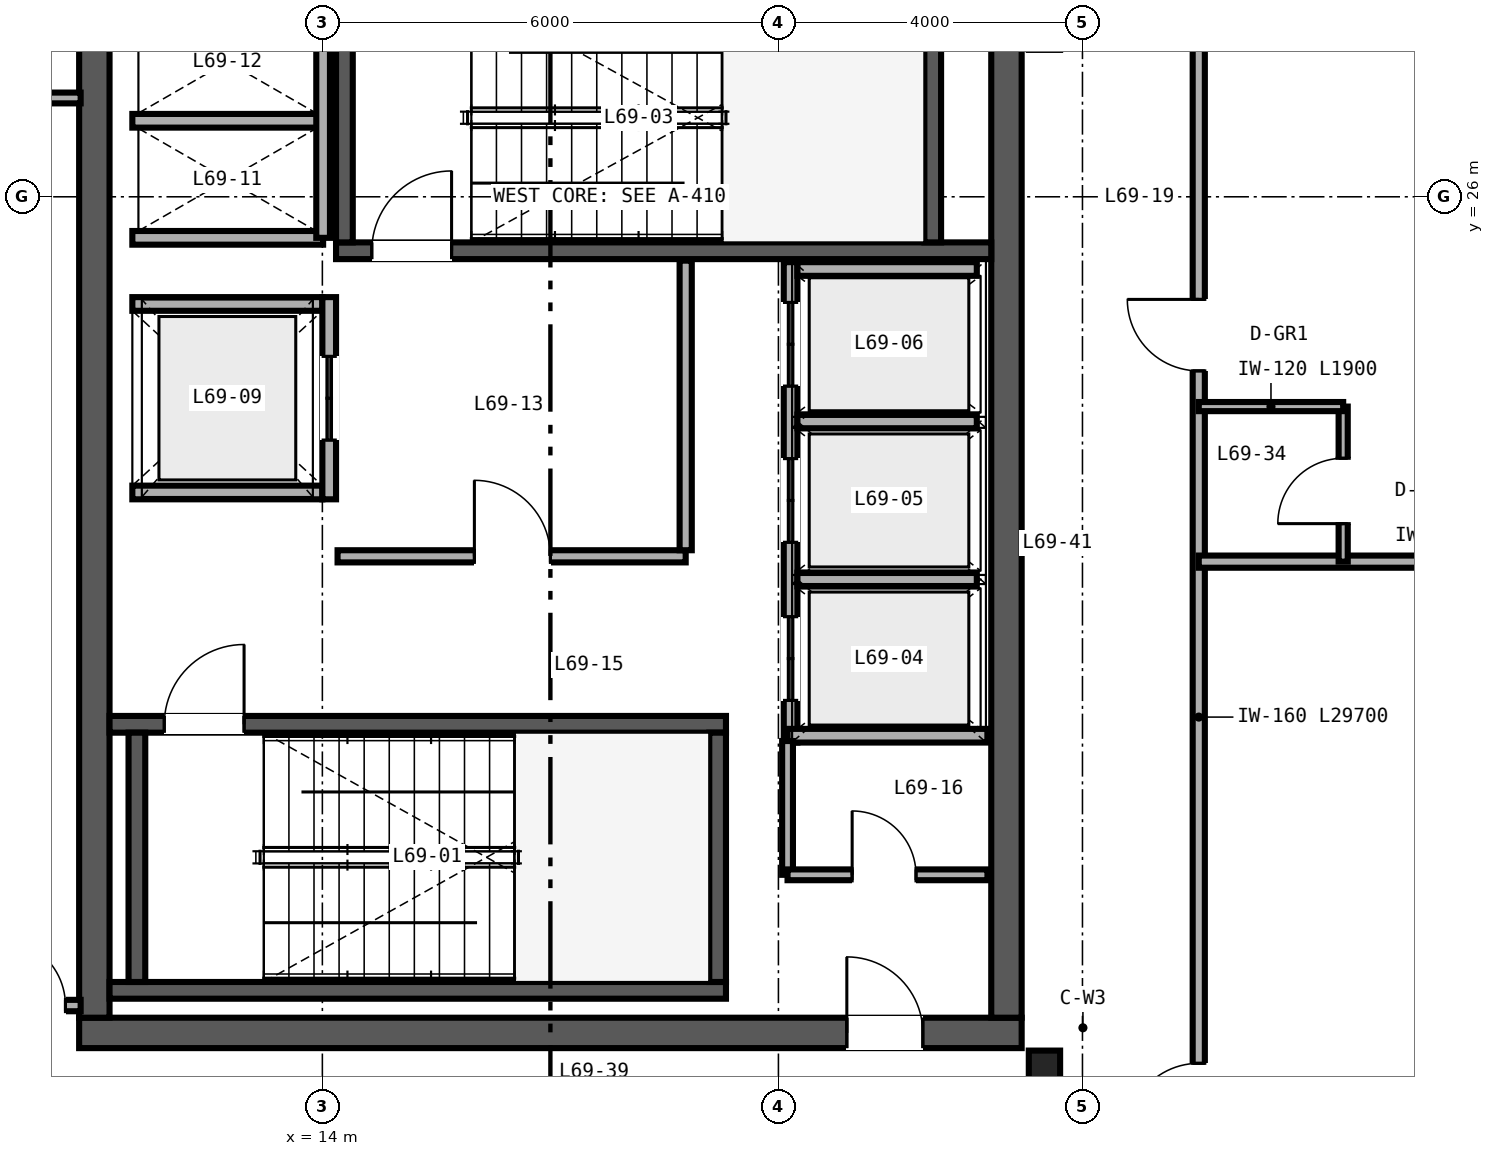
"""IFC4 building model, lengths in metres.
Left out: names, types, materials, properties, quantities, classifications, styles, units other than length and angle.
Written with IfcOpenShell. Run it as: python <this file> out.ifc"""

import sys

from ifc_helpers import new_model, si_unit, direction, frame, frame_2d, origin, origin_2d, place, context, subcontext, project, spatial, rectangle, i_section, extrude, source, transform, mapped, element, fill, save


model = new_model("IFC4")
c1 = context("Model", 3, precision=1e-05, world=origin(), true_north=direction((0.0, 1.0)))
c2 = subcontext(c1, "Body", "Model", "MODEL_VIEW")
j1 = project(units=[si_unit("LENGTHUNIT", "METRE"), si_unit("PLANEANGLEUNIT", "RADIAN")], contexts=[c1])
p1 = place(None, origin())
s1 = spatial("IfcSite", under=j1, at=p1, CompositionType="ELEMENT")
p2 = place(p1, origin())
s2 = spatial("IfcBuilding", under=s1, at=p2, CompositionType="ELEMENT")
p3 = place(p2, frame((0.0, 0.0, 272.4)))
s3 = spatial("IfcBuildingStorey", under=s2, at=p3, CompositionType="ELEMENT", Elevation=272.4)
p4 = place(p3, frame((10.8, 15.0, 0.0), z_axis=(0.0, 0.0, 1.0), x_axis=(1.0, 0.0, 0.0)))
e1 = element("IfcWall", 1, at=p4, inside=s3, PredefinedType="SHEAR", context=c2, shape_type="SweptSolid", body=[
    extrude(rectangle(XDim=12.4, YDim=0.4, at=frame_2d((6.2, 0.0))), origin(), (0.0, 0.0, 1.0), 3.38),
])
p5 = place(p4, frame((10.1, 0.0, 0.0)))
e2 = element("IfcOpeningElement", 2, at=p5, cuts=e1, PredefinedType="OPENING", context=c2, shape_type="SweptSolid", body=[
    extrude(rectangle(XDim=1.0, YDim=2.15, at=frame_2d((0.5, 1.075))), frame((0.0, 0.21, 0.0), z_axis=(0.0, -1.0, 0.0), x_axis=(1.0, 0.0, 0.0)), (0.0, 0.0, 1.0), 0.42),
])
for number, where, z_axis, x_axis in (
    (3, (11.0, 15.2, 0.0), (0.0, 0.0, 1.0), (0.0, 1.0, 0.0)),
    (4, (23.0, 15.2, 0.0), (0.0, 0.0, 1.0), (0.0, 1.0, 0.0)),
):
    element("IfcWall", number, at=place(p3, frame(where, z_axis=z_axis, x_axis=x_axis)), inside=s3, PredefinedType="SHEAR", context=c2, shape_type="SweptSolid", body=[
        extrude(rectangle(XDim=21.6, YDim=0.4, at=frame_2d((10.8, 0.0))), origin(), (0.0, 0.0, 1.0), 3.38),
    ])
p6 = place(p3, frame((11.2, 15.56, 0.0), z_axis=(0.0, 0.0, 1.0), x_axis=(1.0, 0.0, 0.0)))
e5 = element("IfcWall", 5, at=p6, inside=s3, PredefinedType="SHEAR", context=c2, shape_type="SweptSolid", body=[
    extrude(rectangle(XDim=8.11, YDim=0.22, at=frame_2d((4.055, 0.0))), origin(), (0.0, 0.0, 1.0), 3.4),
])
p7 = place(p3, frame((11.2, 19.06, 0.0), z_axis=(0.0, 0.0, 1.0), x_axis=(1.0, 0.0, 0.0)))
e6 = element("IfcWall", 6, at=p7, inside=s3, PredefinedType="SHEAR", context=c2, shape_type="SweptSolid", body=[
    extrude(rectangle(XDim=8.11, YDim=0.22, at=frame_2d((4.055, 0.0))), origin(), (0.0, 0.0, 1.0), 3.4),
])
p8 = place(p7, frame((0.72, 0.0, 0.0)))
e7 = element("IfcOpeningElement", 7, at=p8, cuts=e6, PredefinedType="OPENING", context=c2, shape_type="SweptSolid", body=[
    extrude(rectangle(XDim=1.05, YDim=2.15, at=frame_2d((0.525, 1.075))), frame((0.0, 0.12, 0.0), z_axis=(0.0, -1.0, 0.0), x_axis=(1.0, 0.0, 0.0)), (0.0, 0.0, 1.0), 0.24),
])
for number, where, z_axis, x_axis in (
    (8, (11.56, 15.67, 0.0), (0.0, 0.0, 1.0), (0.0, 1.0, 0.0)),
    (9, (19.2, 15.67, 0.0), (0.0, 0.0, 1.0), (0.0, 1.0, 0.0)),
):
    element("IfcWall", number, at=place(p3, frame(where, z_axis=z_axis, x_axis=x_axis)), inside=s3, PredefinedType="SHEAR", context=c2, shape_type="SweptSolid", body=[
        extrude(rectangle(XDim=3.28, YDim=0.22, at=frame_2d((1.64, 0.0))), origin(), (0.0, 0.0, 1.0), 3.4),
    ])
p9 = place(p3, frame((14.18, 25.29, 0.0), z_axis=(0.0, 0.0, 1.0), x_axis=(1.0, 0.0, 0.0)))
e10 = element("IfcWall", 10, at=p9, inside=s3, PredefinedType="SHEAR", context=c2, shape_type="SweptSolid", body=[
    extrude(rectangle(XDim=8.62, YDim=0.22, at=frame_2d((4.31, 0.0))), origin(), (0.0, 0.0, 1.0), 3.4),
])
p10 = place(p9, frame((0.47, 0.0, 0.0)))
e11 = element("IfcOpeningElement", 11, at=p10, cuts=e10, PredefinedType="OPENING", context=c2, shape_type="SweptSolid", body=[
    extrude(rectangle(XDim=1.05, YDim=2.15, at=frame_2d((0.525, 1.075))), frame((0.0, 0.12, 0.0), z_axis=(0.0, -1.0, 0.0), x_axis=(1.0, 0.0, 0.0)), (0.0, 0.0, 1.0), 0.24),
])
for number, where, z_axis, x_axis in (
    (12, (14.29, 25.4, 0.0), (0.0, 0.0, 1.0), (0.0, 1.0, 0.0)),
    (13, (22.03, 25.4, 0.0), (0.0, 0.0, 1.0), (0.0, 1.0, 0.0)),
):
    element("IfcWall", number, at=place(p3, frame(where, z_axis=z_axis, x_axis=x_axis)), inside=s3, PredefinedType="SHEAR", context=c2, shape_type="SweptSolid", body=[
        extrude(rectangle(XDim=3.28, YDim=0.22, at=frame_2d((1.64, 0.0))), origin(), (0.0, 0.0, 1.0), 3.4),
    ])
m1 = source(origin(), c2, "Body", "SweptSolid", [
    extrude(i_section(OverallWidth=0.412, OverallDepth=0.435, WebThickness=0.036, FlangeThickness=0.057, FilletRadius=0.025, at=origin_2d()), origin(), (0.0, 0.0, 1.0), 3.38),
])
p11 = place(p3, frame((23.5, 14.55, 0.0), z_axis=(0.0, 0.0, 1.0), x_axis=(1.0, 0.0, 0.0)))
e14 = element("IfcColumn", 14, at=p11, inside=s3, PredefinedType="COLUMN", context=c2, shape_type="MappedRepresentation", body=[
    mapped(m1, transform((0.0, 0.0, 0.0), scale=1.0)),
])
p12 = place(p3, frame((20.16, 18.82, 0.0), z_axis=(0.0, 0.0, 1.0), x_axis=(0.0, 1.0, 0.0)))
e15 = element("IfcWall", 15, at=p12, inside=s3, PredefinedType="SOLIDWALL", context=c2, shape_type="SweptSolid", body=[
    extrude(rectangle(XDim=6.32, YDim=0.18, at=frame_2d((3.16, 0.0))), origin(), (0.0, 0.0, 1.0), 2.48),
])
p13 = place(p12, frame((0.555, 0.0, 0.0)))
e16 = element("IfcOpeningElement", 16, at=p13, cuts=e15, PredefinedType="OPENING", context=c2, shape_type="SweptSolid", body=[
    extrude(rectangle(XDim=1.1, YDim=2.2, at=frame_2d((0.55, 1.1))), frame((0.0, 0.1, 0.0), z_axis=(0.0, -1.0, 0.0), x_axis=(1.0, 0.0, 0.0)), (0.0, 0.0, 1.0), 0.2),
])
p14 = place(p12, frame((2.635, 0.0, 0.0)))
e17 = element("IfcOpeningElement", 17, at=p14, cuts=e15, PredefinedType="OPENING", context=c2, shape_type="SweptSolid", body=[
    extrude(rectangle(XDim=1.1, YDim=2.2, at=frame_2d((0.55, 1.1))), frame((0.0, 0.1, 0.0), z_axis=(0.0, -1.0, 0.0), x_axis=(1.0, 0.0, 0.0)), (0.0, 0.0, 1.0), 0.2),
])
p15 = place(p12, frame((4.69, 0.0, 0.0)))
e18 = element("IfcOpeningElement", 18, at=p15, cuts=e15, PredefinedType="OPENING", context=c2, shape_type="SweptSolid", body=[
    extrude(rectangle(XDim=1.1, YDim=2.2, at=frame_2d((0.55, 1.1))), frame((0.0, 0.1, 0.0), z_axis=(0.0, -1.0, 0.0), x_axis=(1.0, 0.0, 0.0)), (0.0, 0.0, 1.0), 0.2),
])
p16 = place(p3, frame((20.12, 18.91, 0.0), z_axis=(0.0, 0.0, 1.0), x_axis=(1.0, 0.0, 0.0)))
e19 = element("IfcWall", 19, at=p16, inside=s3, PredefinedType="SOLIDWALL", context=c2, shape_type="SweptSolid", body=[
    extrude(rectangle(XDim=2.63, YDim=0.18, at=frame_2d((1.315, 0.0))), origin(), (0.0, 0.0, 1.0), 3.38),
])
p17 = place(p3, frame((20.25, 25.05, 0.0), z_axis=(0.0, 0.0, 1.0), x_axis=(1.0, 0.0, 0.0)))
e20 = element("IfcWall", 20, at=p17, inside=s3, PredefinedType="SOLIDWALL", context=c2, shape_type="SweptSolid", body=[
    extrude(rectangle(XDim=2.36, YDim=0.18, at=frame_2d((1.18, 0.0))), origin(), (0.0, 0.0, 1.0), 3.38),
])
p18 = place(p3, frame((20.25, 20.965, 0.0), z_axis=(0.0, 0.0, 1.0), x_axis=(1.0, 0.0, 0.0)))
e21 = element("IfcWall", 21, at=p18, inside=s3, PredefinedType="SOLIDWALL", context=c2, shape_type="SweptSolid", body=[
    extrude(rectangle(XDim=2.36, YDim=0.18, at=frame_2d((1.18, 0.0))), origin(), (0.0, 0.0, 1.0), 2.48),
])
p19 = place(p3, frame((20.25, 23.045, 0.0), z_axis=(0.0, 0.0, 1.0), x_axis=(1.0, 0.0, 0.0)))
e22 = element("IfcWall", 22, at=p19, inside=s3, PredefinedType="SOLIDWALL", context=c2, shape_type="SweptSolid", body=[
    extrude(rectangle(XDim=2.36, YDim=0.18, at=frame_2d((1.18, 0.0))), origin(), (0.0, 0.0, 1.0), 3.38),
])
for number, where, z_axis, x_axis in (
    (23, (11.5, 22.11, 0.0), (0.0, 0.0, 1.0), (1.0, 0.0, 0.0)),
    (24, (11.5, 24.59, 0.0), (0.0, 0.0, 1.0), (1.0, 0.0, 0.0)),
):
    element("IfcWall", number, at=place(p3, frame(where, z_axis=z_axis, x_axis=x_axis)), inside=s3, PredefinedType="SOLIDWALL", context=c2, shape_type="SweptSolid", body=[
        extrude(rectangle(XDim=2.5, YDim=0.18, at=frame_2d((1.25, 0.0))), origin(), (0.0, 0.0, 1.0), 3.38),
    ])
p20 = place(p3, frame((14.09, 22.02, 0.0), z_axis=(0.0, 0.0, 1.0), x_axis=(0.0, 1.0, 0.0)))
e25 = element("IfcWall", 25, at=p20, inside=s3, PredefinedType="SOLIDWALL", context=c2, shape_type="SweptSolid", body=[
    extrude(rectangle(XDim=2.66, YDim=0.18, at=frame_2d((1.33, 0.0))), origin(), (0.0, 0.0, 1.0), 3.38),
])
p21 = place(p20, frame((0.78, 0.0, 0.0)))
e26 = element("IfcOpeningElement", 26, at=p21, cuts=e25, PredefinedType="OPENING", context=c2, shape_type="SweptSolid", body=[
    extrude(rectangle(XDim=1.1, YDim=2.2, at=frame_2d((0.55, 1.1))), frame((0.0, 0.1, 0.0), z_axis=(0.0, -1.0, 0.0), x_axis=(1.0, 0.0, 0.0)), (0.0, 0.0, 1.0), 0.2),
])
for number, where, z_axis, x_axis in (
    (27, (11.5, 25.46, 0.0), (0.0, 0.0, 1.0), (1.0, 0.0, 0.0)),
    (28, (11.5, 27.0, 0.0), (0.0, 0.0, 1.0), (1.0, 0.0, 0.0)),
):
    element("IfcWall", number, at=place(p3, frame(where, z_axis=z_axis, x_axis=x_axis)), inside=s3, PredefinedType="SOLIDWALL", context=c2, shape_type="SweptSolid", body=[
        extrude(rectangle(XDim=2.51, YDim=0.18, at=frame_2d((1.255, 0.0))), origin(), (0.0, 0.0, 1.0), 3.38),
    ])
p22 = place(p3, frame((14.01, 25.46, 0.0), z_axis=(0.0, 0.0, 1.0), x_axis=(0.0, 1.0, 0.0)))
e29 = element("IfcWall", 29, at=p22, inside=s3, PredefinedType="SOLIDWALL", context=c2, shape_type="SweptSolid", body=[
    extrude(rectangle(XDim=3.08, YDim=0.18, at=frame_2d((1.54, 0.0))), origin(), (0.0, 0.0, 1.0), 3.38),
])
p23 = place(p3, frame((14.2, 21.27, 0.0), z_axis=(0.0, 0.0, 1.0), x_axis=(1.0, 0.0, 0.0)))
e30 = element("IfcWall", 30, at=p23, inside=s3, PredefinedType="PARTITIONING", context=c2, shape_type="SweptSolid", body=[
    extrude(rectangle(XDim=4.58, YDim=0.16, at=frame_2d((2.29, 0.0))), origin(), (0.0, 0.0, 1.0), 3.38),
])
p24 = place(p23, frame((1.8, 0.0, 0.0)))
e31 = element("IfcOpeningElement", 31, at=p24, cuts=e30, PredefinedType="OPENING", context=c2, shape_type="SweptSolid", body=[
    extrude(rectangle(XDim=1.0, YDim=2.15, at=frame_2d((0.5, 1.075))), frame((0.0, 0.09, 0.0), z_axis=(0.0, -1.0, 0.0), x_axis=(1.0, 0.0, 0.0)), (0.0, 0.0, 1.0), 0.18),
])
p25 = place(p3, frame((18.78, 21.35, 0.0), z_axis=(0.0, 0.0, 1.0), x_axis=(0.0, 1.0, 0.0)))
e32 = element("IfcWall", 32, at=p25, inside=s3, PredefinedType="PARTITIONING", context=c2, shape_type="SweptSolid", body=[
    extrude(rectangle(XDim=3.81, YDim=0.16, at=frame_2d((1.905, 0.0))), origin(), (0.0, 0.0, 1.0), 3.38),
])
p26 = place(p3, frame((20.12, 17.08, 0.0), z_axis=(0.0, 0.0, 1.0), x_axis=(0.0, 1.0, 0.0)))
e33 = element("IfcWall", 33, at=p26, inside=s3, PredefinedType="PARTITIONING", context=c2, shape_type="SweptSolid", body=[
    extrude(rectangle(XDim=1.76, YDim=0.142, at=frame_2d((0.88, 0.0))), origin(), (0.0, 0.0, 1.0), 3.38),
])
p27 = place(p3, frame((20.12, 17.08, 0.0), z_axis=(0.0, 0.0, 1.0), x_axis=(1.0, 0.0, 0.0)))
e34 = element("IfcWall", 34, at=p27, inside=s3, PredefinedType="PARTITIONING", context=c2, shape_type="SweptSolid", body=[
    extrude(rectangle(XDim=2.63, YDim=0.142, at=frame_2d((1.315, 0.0))), origin(), (0.0, 0.0, 1.0), 3.38),
])
p28 = place(p27, frame((0.85, 0.0, 0.0)))
e35 = element("IfcOpeningElement", 35, at=p28, cuts=e34, PredefinedType="OPENING", context=c2, shape_type="SweptSolid", body=[
    extrude(rectangle(XDim=0.84, YDim=2.1, at=frame_2d((0.42, 1.05))), frame((0.0, 0.081, 0.0), z_axis=(0.0, -1.0, 0.0), x_axis=(1.0, 0.0, 0.0)), (0.0, 0.0, 1.0), 0.162),
])
p29 = place(p3, frame((8.16, 15.36, 0.0), z_axis=(0.0, 0.0, 1.0), x_axis=(1.0, 0.0, 0.0)))
e36 = element("IfcWall", 36, at=p29, inside=s3, PredefinedType="PARTITIONING", context=c2, shape_type="SweptSolid", body=[
    extrude(rectangle(XDim=2.66, YDim=0.15, at=frame_2d((1.33, 0.0))), origin(), (0.0, 0.0, 1.0), 2.601),
])
p30 = place(p29, frame((1.58, 0.0, 0.0)))
e37 = element("IfcOpeningElement", 37, at=p30, cuts=e36, PredefinedType="OPENING", context=c2, shape_type="SweptSolid", body=[
    extrude(rectangle(XDim=0.88, YDim=2.15, at=frame_2d((0.44, 1.075))), frame((0.0, 0.085, 0.0), z_axis=(0.0, -1.0, 0.0), x_axis=(1.0, 0.0, 0.0)), (0.0, 0.0, 1.0), 0.17),
])
p31 = place(p3, frame((8.16, 27.3, 0.0), z_axis=(0.0, 0.0, 1.0), x_axis=(1.0, 0.0, 0.0)))
e38 = element("IfcWall", 38, at=p31, inside=s3, PredefinedType="PARTITIONING", context=c2, shape_type="SweptSolid", body=[
    extrude(rectangle(XDim=2.66, YDim=0.142, at=frame_2d((1.33, 0.0))), origin(), (0.0, 0.0, 1.0), 2.601),
])
p32 = place(p3, frame((25.53, 11.15, 0.0), z_axis=(0.0, 0.0, 1.0), x_axis=(0.0, 1.0, 0.0)))
e39 = element("IfcWall", 39, at=p32, inside=s3, PredefinedType="PARTITIONING", context=c2, shape_type="SweptSolid", body=[
    extrude(rectangle(XDim=29.7, YDim=0.16, at=frame_2d((14.85, 0.0))), origin(), (0.0, 0.0, 1.0), 2.524),
])
p33 = place(p32, frame((2.51, 0.0, 0.0)))
e40 = element("IfcOpeningElement", 40, at=p33, cuts=e39, PredefinedType="OPENING", context=c2, shape_type="SweptSolid", body=[
    extrude(rectangle(XDim=0.94, YDim=2.15, at=frame_2d((0.47, 1.075))), frame((0.0, 0.09, 0.0), z_axis=(0.0, -1.0, 0.0), x_axis=(1.0, 0.0, 0.0)), (0.0, 0.0, 1.0), 0.18),
])
p34 = place(p32, frame((12.56, 0.0, 0.0)))
e41 = element("IfcOpeningElement", 41, at=p34, cuts=e39, PredefinedType="OPENING", context=c2, shape_type="SweptSolid", body=[
    extrude(rectangle(XDim=0.94, YDim=2.15, at=frame_2d((0.47, 1.075))), frame((0.0, 0.09, 0.0), z_axis=(0.0, -1.0, 0.0), x_axis=(1.0, 0.0, 0.0)), (0.0, 0.0, 1.0), 0.18),
])
p35 = place(p32, frame((22.16, 0.0, 0.0)))
e42 = element("IfcOpeningElement", 42, at=p35, cuts=e39, PredefinedType="OPENING", context=c2, shape_type="SweptSolid", body=[
    extrude(rectangle(XDim=0.94, YDim=2.15, at=frame_2d((0.47, 1.075))), frame((0.0, 0.09, 0.0), z_axis=(0.0, -1.0, 0.0), x_axis=(1.0, 0.0, 0.0)), (0.0, 0.0, 1.0), 0.18),
])
p36 = place(p3, frame((25.53, 21.2, 0.0), z_axis=(0.0, 0.0, 1.0), x_axis=(1.0, 0.0, 0.0)))
e43 = element("IfcWall", 43, at=p36, inside=s3, PredefinedType="PARTITIONING", context=c2, shape_type="SweptSolid", body=[
    extrude(rectangle(XDim=7.15, YDim=0.16, at=frame_2d((3.575, 0.0))), origin(), (0.0, 0.0, 1.0), 2.601),
])
p37 = place(p3, frame((27.43, 21.2, 0.0), z_axis=(0.0, 0.0, 1.0), x_axis=(0.0, 1.0, 0.0)))
e44 = element("IfcWall", 44, at=p37, inside=s3, PredefinedType="PARTITIONING", context=c2, shape_type="SweptSolid", body=[
    extrude(rectangle(XDim=2.04, YDim=0.12, at=frame_2d((1.02, 0.0))), origin(), (0.0, 0.0, 1.0), 3.38),
])
p38 = place(p37, frame((0.5, 0.0, 0.0)))
e45 = element("IfcOpeningElement", 45, at=p38, cuts=e44, PredefinedType="OPENING", context=c2, shape_type="SweptSolid", body=[
    extrude(rectangle(XDim=0.86, YDim=2.1, at=frame_2d((0.43, 1.05))), frame((0.0, 0.07, 0.0), z_axis=(0.0, -1.0, 0.0), x_axis=(1.0, 0.0, 0.0)), (0.0, 0.0, 1.0), 0.14),
])
p39 = place(p3, frame((25.53, 23.24, 0.0), z_axis=(0.0, 0.0, 1.0), x_axis=(1.0, 0.0, 0.0)))
e46 = element("IfcWall", 46, at=p39, inside=s3, PredefinedType="PARTITIONING", context=c2, shape_type="SweptSolid", body=[
    extrude(rectangle(XDim=1.9, YDim=0.12, at=frame_2d((0.95, 0.0))), origin(), (0.0, 0.0, 1.0), 3.38),
])
m2 = source(origin(), c2, "Body", "SweptSolid", [
    extrude(rectangle(XDim=1.05, YDim=2.15, at=frame_2d((0.525, 1.075))), frame((0.0, 0.025, 0.0), z_axis=(0.0, -1.0, 0.0), x_axis=(1.0, 0.0, 0.0)), (0.0, 0.0, 1.0), 0.05),
])
p40 = place(p8, origin())
e47 = element("IfcDoor", 47, at=p40, inside=s3, OperationType="SINGLE_SWING_RIGHT", PredefinedType="DOOR", context=c2, shape_type="MappedRepresentation", body=[
    mapped(m2, transform((0.0, 0.0, 0.0), scale=1.0)),
])
fill(e7, e47)
p41 = place(p10, origin())
e48 = element("IfcDoor", 48, at=p41, inside=s3, OperationType="SINGLE_SWING_RIGHT", PredefinedType="DOOR", context=c2, shape_type="MappedRepresentation", body=[
    mapped(m2, transform((0.0, 0.0, 0.0), scale=1.0)),
])
fill(e11, e48)
m3 = source(origin(), c2, "Body", "SweptSolid", [
    extrude(rectangle(XDim=1.1, YDim=2.2, at=frame_2d((0.55, 1.1))), frame((0.0, 0.025, 0.0), z_axis=(0.0, -1.0, 0.0), x_axis=(1.0, 0.0, 0.0)), (0.0, 0.0, 1.0), 0.05),
])
p42 = place(p13, origin())
e49 = element("IfcDoor", 49, at=p42, inside=s3, OperationType="DOUBLE_DOOR_SLIDING", PredefinedType="DOOR", context=c2, shape_type="MappedRepresentation", body=[
    mapped(m3, transform((0.0, 0.0, 0.0), scale=1.0)),
])
fill(e16, e49)
p43 = place(p14, origin())
e50 = element("IfcDoor", 50, at=p43, inside=s3, OperationType="DOUBLE_DOOR_SLIDING", PredefinedType="DOOR", context=c2, shape_type="MappedRepresentation", body=[
    mapped(m3, transform((0.0, 0.0, 0.0), scale=1.0)),
])
fill(e17, e50)
p44 = place(p15, origin())
e51 = element("IfcDoor", 51, at=p44, inside=s3, OperationType="DOUBLE_DOOR_SLIDING", PredefinedType="DOOR", context=c2, shape_type="MappedRepresentation", body=[
    mapped(m3, transform((0.0, 0.0, 0.0), scale=1.0)),
])
fill(e18, e51)
p45 = place(p21, origin())
e52 = element("IfcDoor", 52, at=p45, inside=s3, OperationType="DOUBLE_DOOR_SLIDING", PredefinedType="DOOR", context=c2, shape_type="MappedRepresentation", body=[
    mapped(m3, transform((0.0, 0.0, 0.0), scale=1.0)),
])
fill(e26, e52)
m4 = source(origin(), c2, "Body", "SweptSolid", [
    extrude(rectangle(XDim=1.0, YDim=2.15, at=frame_2d((0.5, 1.075))), frame((0.0, 0.025, 0.0), z_axis=(0.0, -1.0, 0.0), x_axis=(1.0, 0.0, 0.0)), (0.0, 0.0, 1.0), 0.05),
])
p46 = place(p24, origin())
e53 = element("IfcDoor", 53, at=p46, inside=s3, OperationType="SINGLE_SWING_LEFT", PredefinedType="DOOR", context=c2, shape_type="MappedRepresentation", body=[
    mapped(m4, transform((0.0, 0.0, 0.0), scale=1.0)),
])
fill(e31, e53)
m5 = source(origin(), c2, "Body", "SweptSolid", [
    extrude(rectangle(XDim=0.84, YDim=2.1, at=frame_2d((0.42, 1.05))), frame((0.0, 0.025, 0.0), z_axis=(0.0, -1.0, 0.0), x_axis=(1.0, 0.0, 0.0)), (0.0, 0.0, 1.0), 0.05),
])
p47 = place(p28, origin())
e54 = element("IfcDoor", 54, at=p47, inside=s3, OperationType="SINGLE_SWING_LEFT", PredefinedType="DOOR", context=c2, shape_type="MappedRepresentation", body=[
    mapped(m5, transform((0.0, 0.0, 0.0), scale=1.0)),
])
fill(e35, e54)
p48 = place(p5, origin())
e55 = element("IfcDoor", 55, at=p48, inside=s3, OperationType="SINGLE_SWING_LEFT", PredefinedType="DOOR", context=c2, shape_type="MappedRepresentation", body=[
    mapped(m4, transform((0.0, 0.0, 0.0), scale=1.0)),
])
fill(e2, e55)
m6 = source(origin(), c2, "Body", "SweptSolid", [
    extrude(rectangle(XDim=0.88, YDim=2.15, at=frame_2d((0.44, 1.075))), frame((0.0, 0.025, 0.0), z_axis=(0.0, -1.0, 0.0), x_axis=(1.0, 0.0, 0.0)), (0.0, 0.0, 1.0), 0.05),
])
p49 = place(p30, origin())
e56 = element("IfcDoor", 56, at=p49, inside=s3, OperationType="SINGLE_SWING_LEFT", PredefinedType="DOOR", context=c2, shape_type="MappedRepresentation", body=[
    mapped(m6, transform((0.0, 0.0, 0.0), scale=1.0)),
])
fill(e37, e56)
m7 = source(origin(), c2, "Body", "SweptSolid", [
    extrude(rectangle(XDim=0.94, YDim=2.15, at=frame_2d((0.47, 1.075))), frame((0.0, 0.025, 0.0), z_axis=(0.0, -1.0, 0.0), x_axis=(1.0, 0.0, 0.0)), (0.0, 0.0, 1.0), 0.05),
])
p50 = place(p33, origin())
e57 = element("IfcDoor", 57, at=p50, inside=s3, OperationType="SINGLE_SWING_LEFT", PredefinedType="DOOR", context=c2, shape_type="MappedRepresentation", body=[
    mapped(m7, transform((0.0, 0.0, 0.0), scale=1.0)),
])
fill(e40, e57)
m8 = source(origin(), c2, "Body", "SweptSolid", [
    extrude(rectangle(XDim=0.86, YDim=2.1, at=frame_2d((0.43, 1.05))), frame((0.0, 0.025, 0.0), z_axis=(0.0, -1.0, 0.0), x_axis=(1.0, 0.0, 0.0)), (0.0, 0.0, 1.0), 0.05),
])
p51 = place(p38, origin())
e58 = element("IfcDoor", 58, at=p51, inside=s3, OperationType="SINGLE_SWING_LEFT", PredefinedType="DOOR", context=c2, shape_type="MappedRepresentation", body=[
    mapped(m8, transform((0.0, 0.0, 0.0), scale=1.0)),
])
fill(e45, e58)
p52 = place(p34, origin())
e59 = element("IfcDoor", 59, at=p52, inside=s3, OperationType="SINGLE_SWING_RIGHT", PredefinedType="DOOR", context=c2, shape_type="MappedRepresentation", body=[
    mapped(m7, transform((0.0, 0.0, 0.0), scale=1.0)),
])
fill(e41, e59)
save(model, sys.argv[1])
